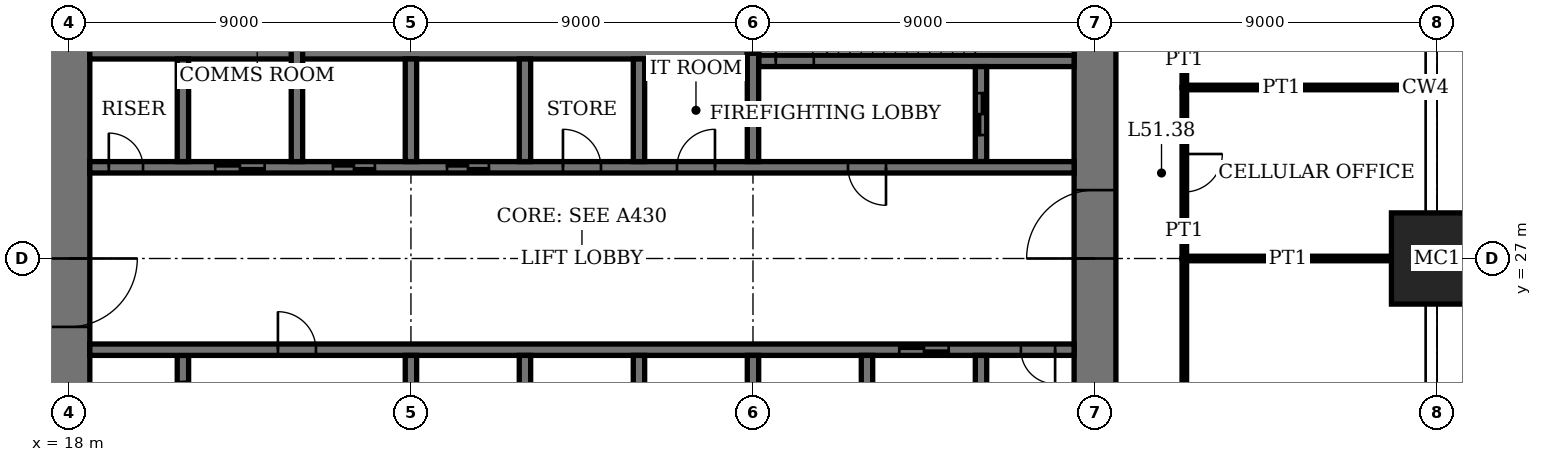
"""IFC4 building model, lengths in metres.
Left out: names, types, materials, properties, quantities, classifications, styles, units other than length and angle.
Written with IfcOpenShell. Run it as: python <this file> out.ifc"""

import sys

from ifc_helpers import new_model, si_unit, direction, frame, frame_2d, origin, origin_2d, place, context, subcontext, project, spatial, rectangle, extrude, element, fill, save


model = new_model("IFC4")
c1 = context("Model", 3, precision=1e-05, world=origin(), true_north=direction((0.0, 1.0)))
c2 = subcontext(c1, "Body", "Model", "MODEL_VIEW")
j1 = project(units=[si_unit("LENGTHUNIT", "METRE"), si_unit("PLANEANGLEUNIT", "RADIAN")], contexts=[c1])
p1 = place(None, origin())
s1 = spatial("IfcSite", under=j1, at=p1, CompositionType="ELEMENT")
p2 = place(p1, origin())
s2 = spatial("IfcBuilding", under=s1, at=p2, CompositionType="ELEMENT")
p3 = place(p2, frame((0.0, 0.0, 210.2)))
s3 = spatial("IfcBuildingStorey", under=s2, at=p3, CompositionType="ELEMENT", Elevation=210.2)
p4 = place(p3, frame((54.0, 27.0, 0.0), z_axis=(0.0, 0.0, 1.0), x_axis=(1.0, 0.0, 0.0)))
e1 = element("IfcColumn", 1, at=p4, inside=s3, PredefinedType="COLUMN", context=c2, shape_type="SweptSolid", body=[
    extrude(rectangle(XDim=2.4, YDim=2.4, at=origin_2d()), origin(), (0.0, 0.0, 1.0), 4.0),
])
p5 = place(p3, frame((18.0, 35.45, 0.0), z_axis=(0.0, 0.0, 1.0), x_axis=(0.0, -1.0, 0.0)))
e2 = element("IfcWall", 2, at=p5, inside=s3, PredefinedType="SHEAR", context=c2, shape_type="SweptSolid", body=[
    extrude(rectangle(XDim=16.9, YDim=1.1, at=frame_2d((8.45, 0.0))), origin(), (0.0, 0.0, 1.0), 4.0),
])
p6 = place(p5, frame((8.45, 0.0, 0.0)))
e3 = element("IfcOpeningElement", 3, at=p6, cuts=e2, PredefinedType="OPENING", context=c2, shape_type="SweptSolid", body=[
    extrude(rectangle(XDim=1.8, YDim=2.4, at=frame_2d((0.9, 1.2))), frame((0.0, 0.56, 0.0), z_axis=(0.0, -1.0, 0.0), x_axis=(1.0, 0.0, 0.0)), (0.0, 0.0, 1.0), 1.12),
])
p7 = place(p3, frame((45.0, 18.55, 0.0), z_axis=(0.0, 0.0, 1.0), x_axis=(0.0, 1.0, 0.0)))
e4 = element("IfcWall", 4, at=p7, inside=s3, PredefinedType="SHEAR", context=c2, shape_type="SweptSolid", body=[
    extrude(rectangle(XDim=16.9, YDim=1.1, at=frame_2d((8.45, 0.0))), origin(), (0.0, 0.0, 1.0), 4.0),
])
p8 = place(p7, frame((8.45, 0.0, 0.0)))
e5 = element("IfcOpeningElement", 5, at=p8, cuts=e4, PredefinedType="OPENING", context=c2, shape_type="SweptSolid", body=[
    extrude(rectangle(XDim=1.8, YDim=2.4, at=frame_2d((0.9, 1.2))), frame((0.0, 0.56, 0.0), z_axis=(0.0, -1.0, 0.0), x_axis=(1.0, 0.0, 0.0)), (0.0, 0.0, 1.0), 1.12),
])
p9 = place(p3, frame((36.15, 32.2, 0.0), z_axis=(0.0, 0.0, 1.0), x_axis=(1.0, 0.0, 0.0)))
e6 = element("IfcWall", 6, at=p9, inside=s3, PredefinedType="SHEAR", context=c2, shape_type="SweptSolid", body=[
    extrude(rectangle(XDim=8.3, YDim=0.3, at=frame_2d((4.15, 0.0))), origin(), (0.0, 0.0, 1.0), 4.0),
])
p10 = place(p9, frame((0.45, 0.0, 0.0)))
e7 = element("IfcOpeningElement", 7, at=p10, cuts=e6, PredefinedType="OPENING", context=c2, shape_type="SweptSolid", body=[
    extrude(rectangle(XDim=1.0, YDim=2.4, at=frame_2d((0.5, 1.2))), frame((0.0, 0.16, 0.0), z_axis=(0.0, -1.0, 0.0), x_axis=(1.0, 0.0, 0.0)), (0.0, 0.0, 1.0), 0.32),
])
p11 = place(p3, frame((36.0, 32.4, 0.0), z_axis=(0.0, 0.0, 1.0), x_axis=(0.0, 1.0, 0.0)))
e8 = element("IfcWall", 8, at=p11, inside=s3, PredefinedType="SHEAR", context=c2, shape_type="SweptSolid", body=[
    extrude(rectangle(XDim=3.05, YDim=0.3, at=frame_2d((1.525, 0.0))), origin(), (0.0, 0.0, 1.0), 4.0),
])
p12 = place(p3, frame((21.0, 21.95, 0.0), z_axis=(0.0, 0.0, 1.0), x_axis=(0.0, 1.0, 0.0)))
e9 = element("IfcWall", 9, at=p12, inside=s3, PredefinedType="SHEAR", context=c2, shape_type="SweptSolid", body=[
    extrude(rectangle(XDim=2.5, YDim=0.3, at=frame_2d((1.25, 0.0))), origin(), (0.0, 0.0, 1.0), 4.0),
])
p13 = place(p12, frame((0.7, 0.0, 0.0)))
e10 = element("IfcOpeningElement", 10, at=p13, cuts=e9, PredefinedType="OPENING", context=c2, shape_type="SweptSolid", body=[
    extrude(rectangle(XDim=1.1, YDim=2.4, at=frame_2d((0.55, 1.2))), frame((0.0, 0.16, 0.0), z_axis=(0.0, -1.0, 0.0), x_axis=(1.0, 0.0, 0.0)), (0.0, 0.0, 1.0), 0.32),
])
p14 = place(p3, frame((42.0, 29.55, 0.0), z_axis=(0.0, 0.0, 1.0), x_axis=(0.0, 1.0, 0.0)))
e11 = element("IfcWall", 11, at=p14, inside=s3, PredefinedType="SHEAR", context=c2, shape_type="SweptSolid", body=[
    extrude(rectangle(XDim=2.5, YDim=0.3, at=frame_2d((1.25, 0.0))), origin(), (0.0, 0.0, 1.0), 4.0),
])
p15 = place(p14, frame((0.7, 0.0, 0.0)))
e12 = element("IfcOpeningElement", 12, at=p15, cuts=e11, PredefinedType="OPENING", context=c2, shape_type="SweptSolid", body=[
    extrude(rectangle(XDim=1.1, YDim=2.4, at=frame_2d((0.55, 1.2))), frame((0.0, 0.16, 0.0), z_axis=(0.0, -1.0, 0.0), x_axis=(1.0, 0.0, 0.0)), (0.0, 0.0, 1.0), 0.32),
])
p16 = place(p3, frame((18.55, 24.6, 0.0), z_axis=(0.0, 0.0, 1.0), x_axis=(1.0, 0.0, 0.0)))
e13 = element("IfcWall", 13, at=p16, inside=s3, PredefinedType="SHEAR", context=c2, shape_type="SweptSolid", body=[
    extrude(rectangle(XDim=25.9, YDim=0.3, at=frame_2d((12.95, 0.0))), origin(), (0.0, 0.0, 1.0), 4.0),
])
p17 = place(p16, frame((4.95, 0.0, 0.0)))
e14 = element("IfcOpeningElement", 14, at=p17, cuts=e13, PredefinedType="OPENING", context=c2, shape_type="SweptSolid", body=[
    extrude(rectangle(XDim=1.0, YDim=2.4, at=frame_2d((0.5, 1.2))), frame((0.0, 0.16, 0.0), z_axis=(0.0, -1.0, 0.0), x_axis=(1.0, 0.0, 0.0)), (0.0, 0.0, 1.0), 0.32),
])
p18 = place(p16, frame((24.5, 0.0, 0.0)))
e15 = element("IfcOpeningElement", 15, at=p18, cuts=e13, PredefinedType="OPENING", context=c2, shape_type="SweptSolid", body=[
    extrude(rectangle(XDim=0.9, YDim=2.1, at=frame_2d((0.45, 1.05))), frame((0.0, 0.16, 0.0), z_axis=(0.0, -1.0, 0.0), x_axis=(1.0, 0.0, 0.0)), (0.0, 0.0, 1.0), 0.32),
])
p19 = place(p16, frame((21.3, 0.0, 0.0)))
e16 = element("IfcOpeningElement", 16, at=p19, cuts=e13, PredefinedType="OPENING", context=c2, shape_type="SweptSolid", body=[
    extrude(rectangle(XDim=1.3, YDim=2.4, at=frame_2d((0.65, 1.2))), frame((0.0, 0.16, 0.0), z_axis=(0.0, -1.0, 0.0), x_axis=(1.0, 0.0, 0.0)), (0.0, 0.0, 1.0), 0.32),
])
p20 = place(p3, frame((18.55, 29.4, 0.0), z_axis=(0.0, 0.0, 1.0), x_axis=(1.0, 0.0, 0.0)))
e17 = element("IfcWall", 17, at=p20, inside=s3, PredefinedType="SHEAR", context=c2, shape_type="SweptSolid", body=[
    extrude(rectangle(XDim=25.9, YDim=0.3, at=frame_2d((12.95, 0.0))), origin(), (0.0, 0.0, 1.0), 4.0),
])
p21 = place(p20, frame((19.95, 0.0, 0.0)))
e18 = element("IfcOpeningElement", 18, at=p21, cuts=e17, PredefinedType="OPENING", context=c2, shape_type="SweptSolid", body=[
    extrude(rectangle(XDim=1.0, YDim=2.4, at=frame_2d((0.5, 1.2))), frame((0.0, 0.16, 0.0), z_axis=(0.0, -1.0, 0.0), x_axis=(1.0, 0.0, 0.0)), (0.0, 0.0, 1.0), 0.32),
])
p22 = place(p20, frame((0.5, 0.0, 0.0)))
e19 = element("IfcOpeningElement", 19, at=p22, cuts=e17, PredefinedType="OPENING", context=c2, shape_type="SweptSolid", body=[
    extrude(rectangle(XDim=0.9, YDim=2.1, at=frame_2d((0.45, 1.05))), frame((0.0, 0.16, 0.0), z_axis=(0.0, -1.0, 0.0), x_axis=(1.0, 0.0, 0.0)), (0.0, 0.0, 1.0), 0.32),
])
p23 = place(p20, frame((15.45, 0.0, 0.0)))
e20 = element("IfcOpeningElement", 20, at=p23, cuts=e17, PredefinedType="OPENING", context=c2, shape_type="SweptSolid", body=[
    extrude(rectangle(XDim=1.0, YDim=2.4, at=frame_2d((0.5, 1.2))), frame((0.0, 0.16, 0.0), z_axis=(0.0, -1.0, 0.0), x_axis=(1.0, 0.0, 0.0)), (0.0, 0.0, 1.0), 0.32),
])
p24 = place(p20, frame((12.45, 0.0, 0.0)))
e21 = element("IfcOpeningElement", 21, at=p24, cuts=e17, PredefinedType="OPENING", context=c2, shape_type="SweptSolid", body=[
    extrude(rectangle(XDim=1.0, YDim=2.4, at=frame_2d((0.5, 1.2))), frame((0.0, 0.16, 0.0), z_axis=(0.0, -1.0, 0.0), x_axis=(1.0, 0.0, 0.0)), (0.0, 0.0, 1.0), 0.32),
])
p25 = place(p20, frame((9.4, 0.0, 0.0)))
e22 = element("IfcOpeningElement", 22, at=p25, cuts=e17, PredefinedType="OPENING", context=c2, shape_type="SweptSolid", body=[
    extrude(rectangle(XDim=1.1, YDim=2.4, at=frame_2d((0.55, 1.2))), frame((0.0, 0.16, 0.0), z_axis=(0.0, -1.0, 0.0), x_axis=(1.0, 0.0, 0.0)), (0.0, 0.0, 1.0), 0.32),
])
p26 = place(p20, frame((6.4, 0.0, 0.0)))
e23 = element("IfcOpeningElement", 23, at=p26, cuts=e17, PredefinedType="OPENING", context=c2, shape_type="SweptSolid", body=[
    extrude(rectangle(XDim=1.1, YDim=2.4, at=frame_2d((0.55, 1.2))), frame((0.0, 0.16, 0.0), z_axis=(0.0, -1.0, 0.0), x_axis=(1.0, 0.0, 0.0)), (0.0, 0.0, 1.0), 0.32),
])
p27 = place(p20, frame((3.3, 0.0, 0.0)))
e24 = element("IfcOpeningElement", 24, at=p27, cuts=e17, PredefinedType="OPENING", context=c2, shape_type="SweptSolid", body=[
    extrude(rectangle(XDim=1.3, YDim=2.4, at=frame_2d((0.65, 1.2))), frame((0.0, 0.16, 0.0), z_axis=(0.0, -1.0, 0.0), x_axis=(1.0, 0.0, 0.0)), (0.0, 0.0, 1.0), 0.32),
])
p28 = place(p3, frame((18.55, 32.4, 0.0), z_axis=(0.0, 0.0, 1.0), x_axis=(1.0, 0.0, 0.0)))
e25 = element("IfcWall", 25, at=p28, inside=s3, PredefinedType="SHEAR", context=c2, shape_type="SweptSolid", body=[
    extrude(rectangle(XDim=17.3, YDim=0.3, at=frame_2d((8.65, 0.0))), origin(), (0.0, 0.0, 1.0), 4.0),
])
for number, where, z_axis, x_axis in (
    (26, (30.0, 21.75, 0.0), (0.0, 0.0, 1.0), (0.0, 1.0, 0.0)),
    (27, (33.0, 29.55, 0.0), (0.0, 0.0, 1.0), (0.0, 1.0, 0.0)),
    (28, (33.0, 21.75, 0.0), (0.0, 0.0, 1.0), (0.0, 1.0, 0.0)),
    (29, (30.0, 29.55, 0.0), (0.0, 0.0, 1.0), (0.0, 1.0, 0.0)),
    (30, (36.0, 21.75, 0.0), (0.0, 0.0, 1.0), (0.0, 1.0, 0.0)),
    (31, (27.0, 29.55, 0.0), (0.0, 0.0, 1.0), (0.0, 1.0, 0.0)),
):
    element("IfcWall", number, at=place(p3, frame(where, z_axis=z_axis, x_axis=x_axis)), inside=s3, PredefinedType="SHEAR", context=c2, shape_type="SweptSolid", body=[
        extrude(rectangle(XDim=2.7, YDim=0.3, at=frame_2d((1.35, 0.0))), origin(), (0.0, 0.0, 1.0), 4.0),
    ])
for number, where, z_axis, x_axis in (
    (32, (39.0, 18.55, 0.0), (0.0, 0.0, 1.0), (0.0, 1.0, 0.0)),
    (33, (24.0, 29.55, 0.0), (0.0, 0.0, 1.0), (0.0, 1.0, 0.0)),
):
    element("IfcWall", number, at=place(p3, frame(where, z_axis=z_axis, x_axis=x_axis)), inside=s3, PredefinedType="SHEAR", context=c2, shape_type="SweptSolid", body=[
        extrude(rectangle(XDim=5.9, YDim=0.3, at=frame_2d((2.95, 0.0))), origin(), (0.0, 0.0, 1.0), 4.0),
    ])
for number, where, z_axis, x_axis in (
    (34, (42.0, 21.75, 0.0), (0.0, 0.0, 1.0), (0.0, 1.0, 0.0)),
    (35, (21.0, 29.55, 0.0), (0.0, 0.0, 1.0), (0.0, 1.0, 0.0)),
):
    element("IfcWall", number, at=place(p3, frame(where, z_axis=z_axis, x_axis=x_axis)), inside=s3, PredefinedType="SHEAR", context=c2, shape_type="SweptSolid", body=[
        extrude(rectangle(XDim=2.7, YDim=0.3, at=frame_2d((1.35, 0.0))), origin(), (0.0, 0.0, 1.0), 4.0),
    ])
for number, where, z_axis, x_axis in (
    (36, (27.0, 21.6, 0.0), (0.0, 0.0, 1.0), (0.0, 1.0, 0.0)),
    (37, (36.0, 29.55, 0.0), (0.0, 0.0, 1.0), (0.0, 1.0, 0.0)),
):
    element("IfcWall", number, at=place(p3, frame(where, z_axis=z_axis, x_axis=x_axis)), inside=s3, PredefinedType="SHEAR", context=c2, shape_type="SweptSolid", body=[
        extrude(rectangle(XDim=2.85, YDim=0.3, at=frame_2d((1.425, 0.0))), origin(), (0.0, 0.0, 1.0), 4.0),
    ])
p29 = place(p3, frame((47.35, 27.0, 0.0), z_axis=(0.0, 0.0, 1.0), x_axis=(1.0, 0.0, 0.0)))
e38 = element("IfcWall", 38, at=p29, inside=s3, PredefinedType="PARTITIONING", context=c2, shape_type="SweptSolid", body=[
    extrude(rectangle(XDim=5.45, YDim=0.12, at=frame_2d((2.725, 0.0))), origin(), (0.0, 0.0, 1.0), 3.05),
])
p30 = place(p3, frame((47.35, 31.5, 0.0), z_axis=(0.0, 0.0, 1.0), x_axis=(1.0, 0.0, 0.0)))
e39 = element("IfcWall", 39, at=p30, inside=s3, PredefinedType="PARTITIONING", context=c2, shape_type="SweptSolid", body=[
    extrude(rectangle(XDim=6.34, YDim=0.12, at=frame_2d((3.17, 0.0))), origin(), (0.0, 0.0, 1.0), 3.1),
])
p31 = place(p3, frame((47.35, 9.0, 0.0), z_axis=(0.0, 0.0, 1.0), x_axis=(0.0, 1.0, 0.0)))
e40 = element("IfcWall", 40, at=p31, inside=s3, PredefinedType="PARTITIONING", context=c2, shape_type="SweptSolid", body=[
    extrude(rectangle(XDim=18.0, YDim=0.12, at=frame_2d((9.0, 0.0))), origin(), (0.0, 0.0, 1.0), 3.75),
])
p32 = place(p31, frame((8.1, 0.0, 0.0)))
e41 = element("IfcOpeningElement", 41, at=p32, cuts=e40, PredefinedType="OPENING", context=c2, shape_type="SweptSolid", body=[
    extrude(rectangle(XDim=1.8, YDim=2.4, at=frame_2d((0.9, 1.2))), frame((0.0, 0.07, 0.0), z_axis=(0.0, -1.0, 0.0), x_axis=(1.0, 0.0, 0.0)), (0.0, 0.0, 1.0), 0.14),
])
p33 = place(p3, frame((47.35, 27.0, 0.0), z_axis=(0.0, 0.0, 1.0), x_axis=(0.0, 1.0, 0.0)))
e42 = element("IfcWall", 42, at=p33, inside=s3, PredefinedType="PARTITIONING", context=c2, shape_type="SweptSolid", body=[
    extrude(rectangle(XDim=4.5, YDim=0.12, at=frame_2d((2.25, 0.0))), origin(), (0.0, 0.0, 1.0), 3.75),
])
p34 = place(p33, frame((1.75, 0.0, 0.0)))
e43 = element("IfcOpeningElement", 43, at=p34, cuts=e42, PredefinedType="OPENING", context=c2, shape_type="SweptSolid", body=[
    extrude(rectangle(XDim=1.0, YDim=2.4, at=frame_2d((0.5, 1.2))), frame((0.0, 0.07, 0.0), z_axis=(0.0, -1.0, 0.0), x_axis=(1.0, 0.0, 0.0)), (0.0, 0.0, 1.0), 0.14),
])
p35 = place(p3, frame((47.35, 31.5, 0.0), z_axis=(0.0, 0.0, 1.0), x_axis=(0.0, 1.0, 0.0)))
e44 = element("IfcWall", 44, at=p35, inside=s3, PredefinedType="PARTITIONING", context=c2, shape_type="SweptSolid", body=[
    extrude(rectangle(XDim=4.5, YDim=0.12, at=frame_2d((2.25, 0.0))), origin(), (0.0, 0.0, 1.0), 3.75),
])
p36 = place(p35, frame((1.75, 0.0, 0.0)))
e45 = element("IfcOpeningElement", 45, at=p36, cuts=e44, PredefinedType="OPENING", context=c2, shape_type="SweptSolid", body=[
    extrude(rectangle(XDim=1.0, YDim=2.4, at=frame_2d((0.5, 1.2))), frame((0.0, 0.07, 0.0), z_axis=(0.0, -1.0, 0.0), x_axis=(1.0, 0.0, 0.0)), (0.0, 0.0, 1.0), 0.14),
])
p37 = place(p6, origin())
e46 = element("IfcDoor", 46, at=p37, inside=s3, OperationType="DOUBLE_DOOR_DOUBLE_SWING", PredefinedType="DOOR", context=c2, shape_type="SweptSolid", body=[
    extrude(rectangle(XDim=1.8, YDim=2.4, at=frame_2d((0.9, 1.2))), frame((0.0, 0.03, 0.0), z_axis=(0.0, -1.0, 0.0), x_axis=(1.0, 0.0, 0.0)), (0.0, 0.0, 1.0), 0.06),
    extrude(rectangle(XDim=0.04, YDim=2.4, at=frame_2d((0.02, 1.2))), frame((0.0, 0.55, 0.0), z_axis=(0.0, -1.0, 0.0), x_axis=(1.0, 0.0, 0.0)), (0.0, 0.0, 1.0), 1.1),
    extrude(rectangle(XDim=0.04, YDim=2.4, at=frame_2d((1.78, 1.2))), frame((0.0, 0.55, 0.0), z_axis=(0.0, -1.0, 0.0), x_axis=(1.0, 0.0, 0.0)), (0.0, 0.0, 1.0), 1.1),
    extrude(rectangle(XDim=1.8, YDim=0.04, at=frame_2d((0.9, 2.38))), frame((0.0, 0.55, 0.0), z_axis=(0.0, -1.0, 0.0), x_axis=(1.0, 0.0, 0.0)), (0.0, 0.0, 1.0), 1.1),
])
fill(e3, e46)
p38 = place(p8, origin())
e47 = element("IfcDoor", 47, at=p38, inside=s3, OperationType="DOUBLE_DOOR_DOUBLE_SWING", PredefinedType="DOOR", context=c2, shape_type="SweptSolid", body=[
    extrude(rectangle(XDim=1.8, YDim=2.4, at=frame_2d((0.9, 1.2))), frame((0.0, 0.03, 0.0), z_axis=(0.0, -1.0, 0.0), x_axis=(1.0, 0.0, 0.0)), (0.0, 0.0, 1.0), 0.06),
    extrude(rectangle(XDim=0.04, YDim=2.4, at=frame_2d((0.02, 1.2))), frame((0.0, 0.55, 0.0), z_axis=(0.0, -1.0, 0.0), x_axis=(1.0, 0.0, 0.0)), (0.0, 0.0, 1.0), 1.1),
    extrude(rectangle(XDim=0.04, YDim=2.4, at=frame_2d((1.78, 1.2))), frame((0.0, 0.55, 0.0), z_axis=(0.0, -1.0, 0.0), x_axis=(1.0, 0.0, 0.0)), (0.0, 0.0, 1.0), 1.1),
    extrude(rectangle(XDim=1.8, YDim=0.04, at=frame_2d((0.9, 2.38))), frame((0.0, 0.55, 0.0), z_axis=(0.0, -1.0, 0.0), x_axis=(1.0, 0.0, 0.0)), (0.0, 0.0, 1.0), 1.1),
])
fill(e5, e47)
p39 = place(p10, origin())
e48 = element("IfcDoor", 48, at=p39, inside=s3, OperationType="SINGLE_SWING_RIGHT", PredefinedType="DOOR", context=c2, shape_type="SweptSolid", body=[
    extrude(rectangle(XDim=1.0, YDim=2.4, at=frame_2d((0.5, 1.2))), frame((0.0, 0.03, 0.0), z_axis=(0.0, -1.0, 0.0), x_axis=(1.0, 0.0, 0.0)), (0.0, 0.0, 1.0), 0.06),
])
fill(e7, e48)
p40 = place(p17, origin())
e49 = element("IfcDoor", 49, at=p40, inside=s3, OperationType="SINGLE_SWING_RIGHT", PredefinedType="DOOR", context=c2, shape_type="SweptSolid", body=[
    extrude(rectangle(XDim=1.0, YDim=2.4, at=frame_2d((0.5, 1.2))), frame((0.0, 0.03, 0.0), z_axis=(0.0, -1.0, 0.0), x_axis=(1.0, 0.0, 0.0)), (0.0, 0.0, 1.0), 0.06),
])
fill(e14, e49)
p41 = place(p21, origin())
e50 = element("IfcDoor", 50, at=p41, inside=s3, OperationType="SINGLE_SWING_RIGHT", PredefinedType="DOOR", context=c2, shape_type="SweptSolid", body=[
    extrude(rectangle(XDim=1.0, YDim=2.4, at=frame_2d((0.5, 1.2))), frame((0.0, 0.03, 0.0), z_axis=(0.0, -1.0, 0.0), x_axis=(1.0, 0.0, 0.0)), (0.0, 0.0, 1.0), 0.06),
])
fill(e18, e50)
p42 = place(p18, origin())
e51 = element("IfcDoor", 51, at=p42, inside=s3, OperationType="SINGLE_SWING_RIGHT", PredefinedType="DOOR", context=c2, shape_type="SweptSolid", body=[
    extrude(rectangle(XDim=0.9, YDim=2.1, at=frame_2d((0.45, 1.05))), frame((0.0, 0.03, 0.0), z_axis=(0.0, -1.0, 0.0), x_axis=(1.0, 0.0, 0.0)), (0.0, 0.0, 1.0), 0.06),
])
fill(e15, e51)
p43 = place(p22, origin())
e52 = element("IfcDoor", 52, at=p43, inside=s3, OperationType="SINGLE_SWING_RIGHT", PredefinedType="DOOR", context=c2, shape_type="SweptSolid", body=[
    extrude(rectangle(XDim=0.9, YDim=2.1, at=frame_2d((0.45, 1.05))), frame((0.0, 0.03, 0.0), z_axis=(0.0, -1.0, 0.0), x_axis=(1.0, 0.0, 0.0)), (0.0, 0.0, 1.0), 0.06),
])
fill(e19, e52)
p44 = place(p34, origin())
e53 = element("IfcDoor", 53, at=p44, inside=s3, OperationType="SINGLE_SWING_RIGHT", PredefinedType="DOOR", context=c2, shape_type="SweptSolid", body=[
    extrude(rectangle(XDim=1.0, YDim=2.4, at=frame_2d((0.5, 1.2))), frame((0.0, 0.025, 0.0), z_axis=(0.0, -1.0, 0.0), x_axis=(1.0, 0.0, 0.0)), (0.0, 0.0, 1.0), 0.05),
])
fill(e43, e53)
p45 = place(p23, origin())
e54 = element("IfcDoor", 54, at=p45, inside=s3, OperationType="SINGLE_SWING_LEFT", PredefinedType="DOOR", context=c2, shape_type="SweptSolid", body=[
    extrude(rectangle(XDim=1.0, YDim=2.4, at=frame_2d((0.5, 1.2))), frame((0.0, 0.03, 0.0), z_axis=(0.0, -1.0, 0.0), x_axis=(1.0, 0.0, 0.0)), (0.0, 0.0, 1.0), 0.06),
])
fill(e20, e54)
p46 = place(p24, origin())
e55 = element("IfcDoor", 55, at=p46, inside=s3, OperationType="SINGLE_SWING_RIGHT", PredefinedType="DOOR", context=c2, shape_type="SweptSolid", body=[
    extrude(rectangle(XDim=1.0, YDim=2.4, at=frame_2d((0.5, 1.2))), frame((0.0, 0.03, 0.0), z_axis=(0.0, -1.0, 0.0), x_axis=(1.0, 0.0, 0.0)), (0.0, 0.0, 1.0), 0.06),
])
fill(e21, e55)
p47 = place(p25, origin())
e56 = element("IfcDoor", 56, at=p47, inside=s3, OperationType="DOUBLE_DOOR_SLIDING", PredefinedType="DOOR", context=c2, shape_type="SweptSolid", body=[
    extrude(rectangle(XDim=1.1, YDim=2.4, at=frame_2d((0.55, 1.2))), frame((0.0, 0.02, 0.0), z_axis=(0.0, -1.0, 0.0), x_axis=(1.0, 0.0, 0.0)), (0.0, 0.0, 1.0), 0.04),
])
fill(e22, e56)
p48 = place(p26, origin())
e57 = element("IfcDoor", 57, at=p48, inside=s3, OperationType="DOUBLE_DOOR_SLIDING", PredefinedType="DOOR", context=c2, shape_type="SweptSolid", body=[
    extrude(rectangle(XDim=1.1, YDim=2.4, at=frame_2d((0.55, 1.2))), frame((0.0, 0.02, 0.0), z_axis=(0.0, -1.0, 0.0), x_axis=(1.0, 0.0, 0.0)), (0.0, 0.0, 1.0), 0.04),
])
fill(e23, e57)
p49 = place(p19, origin())
e58 = element("IfcDoor", 58, at=p49, inside=s3, OperationType="DOUBLE_DOOR_SLIDING", PredefinedType="DOOR", context=c2, shape_type="SweptSolid", body=[
    extrude(rectangle(XDim=1.3, YDim=2.4, at=frame_2d((0.65, 1.2))), frame((0.0, 0.02, 0.0), z_axis=(0.0, -1.0, 0.0), x_axis=(1.0, 0.0, 0.0)), (0.0, 0.0, 1.0), 0.04),
])
fill(e16, e58)
p50 = place(p27, origin())
e59 = element("IfcDoor", 59, at=p50, inside=s3, OperationType="DOUBLE_DOOR_SLIDING", PredefinedType="DOOR", context=c2, shape_type="SweptSolid", body=[
    extrude(rectangle(XDim=1.3, YDim=2.4, at=frame_2d((0.65, 1.2))), frame((0.0, 0.02, 0.0), z_axis=(0.0, -1.0, 0.0), x_axis=(1.0, 0.0, 0.0)), (0.0, 0.0, 1.0), 0.04),
])
fill(e24, e59)
p51 = place(p15, origin())
e60 = element("IfcDoor", 60, at=p51, inside=s3, OperationType="DOUBLE_DOOR_SLIDING", PredefinedType="DOOR", context=c2, shape_type="SweptSolid", body=[
    extrude(rectangle(XDim=1.1, YDim=2.4, at=frame_2d((0.55, 1.2))), frame((0.0, 0.03, 0.0), z_axis=(0.0, -1.0, 0.0), x_axis=(1.0, 0.0, 0.0)), (0.0, 0.0, 1.0), 0.06),
])
fill(e12, e60)
save(model, sys.argv[1])
